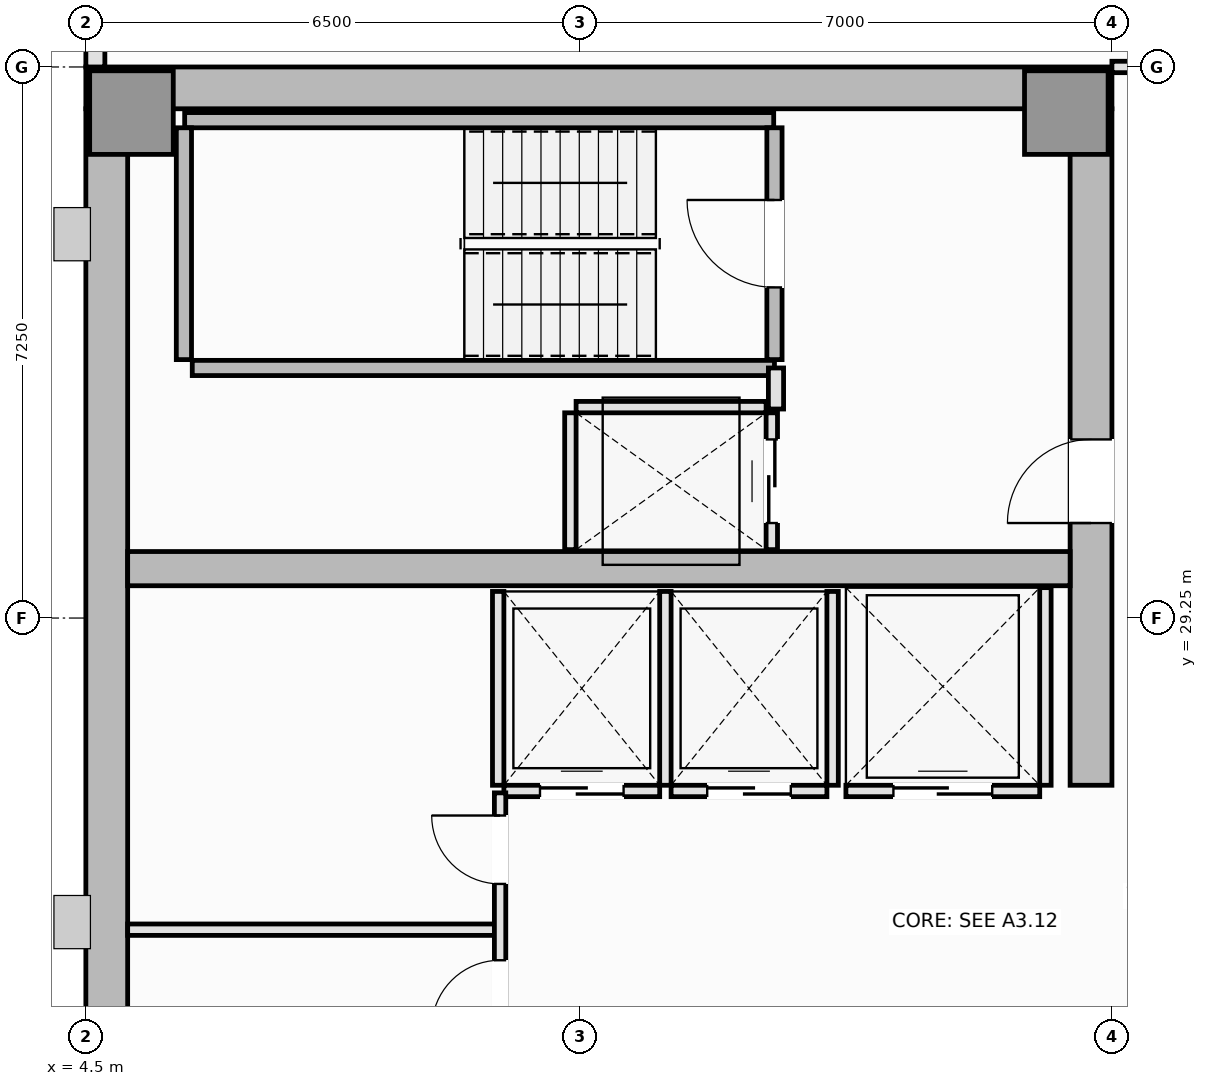
"""IFC4 building model, lengths in metres.
Left out: names, types, materials, properties, quantities, classifications, styles, units other than length and angle.
Written with IfcOpenShell. Run it as: python <this file> out.ifc"""

import sys

from ifc_helpers import new_model, si_unit, direction, frame, frame_2d, origin, origin_2d, place, context, subcontext, project, spatial, rectangle, extrude, element, fill, save


model = new_model("IFC4")
c1 = context("Model", 3, precision=1e-05, world=origin(), true_north=direction((0.0, 1.0)))
c2 = subcontext(c1, "Body", "Model", "MODEL_VIEW")
j1 = project(units=[si_unit("LENGTHUNIT", "METRE"), si_unit("PLANEANGLEUNIT", "RADIAN")], contexts=[c1])
p1 = place(None, origin())
s1 = spatial("IfcSite", under=j1, at=p1, CompositionType="ELEMENT")
p2 = place(p1, origin())
s2 = spatial("IfcBuilding", under=s1, at=p2, CompositionType="ELEMENT")
p3 = place(p2, frame((0.0, 0.0, 209.35)))
s3 = spatial("IfcBuildingStorey", under=s2, at=p3, CompositionType="ELEMENT", Elevation=209.35)
p4 = place(p3, frame((4.5, 36.225, 0.0), z_axis=(0.0, 0.0, 1.0), x_axis=(1.0, 0.0, 0.0)))
e1 = element("IfcWall", 1, at=p4, inside=s3, PredefinedType="SHEAR", context=c2, shape_type="SweptSolid", body=[
    extrude(rectangle(XDim=13.5, YDim=0.55, at=frame_2d((6.75, 0.0))), origin(), (0.0, 0.0, 1.0), 3.55),
])
p5 = place(p3, frame((4.775, 14.55, 0.0), z_axis=(0.0, 0.0, 1.0), x_axis=(0.0, 1.0, 0.0)))
e2 = element("IfcWall", 2, at=p5, inside=s3, PredefinedType="SHEAR", context=c2, shape_type="SweptSolid", body=[
    extrude(rectangle(XDim=21.4, YDim=0.55, at=frame_2d((10.7, 0.0))), origin(), (0.0, 0.0, 1.0), 3.55),
])
p6 = place(p3, frame((17.725, 27.05, 0.0), z_axis=(0.0, 0.0, 1.0), x_axis=(0.0, 1.0, 0.0)))
e3 = element("IfcWall", 3, at=p6, inside=s3, PredefinedType="SHEAR", context=c2, shape_type="SweptSolid", body=[
    extrude(rectangle(XDim=8.9, YDim=0.55, at=frame_2d((4.45, 0.0))), origin(), (0.0, 0.0, 1.0), 3.55),
])
p7 = place(p6, frame((3.45, 0.0, 0.0)))
e4 = element("IfcOpeningElement", 4, at=p7, cuts=e3, PredefinedType="OPENING", context=c2, shape_type="SweptSolid", body=[
    extrude(rectangle(XDim=1.1, YDim=2.15, at=frame_2d((0.55, 1.075))), frame((0.0, 0.285, 0.0), z_axis=(0.0, -1.0, 0.0), x_axis=(1.0, 0.0, 0.0)), (0.0, 0.0, 1.0), 0.57),
])
p8 = place(p3, frame((5.05, 29.9, 0.0), z_axis=(0.0, 0.0, 1.0), x_axis=(1.0, 0.0, 0.0)))
e5 = element("IfcWall", 5, at=p8, inside=s3, PredefinedType="SHEAR", context=c2, shape_type="SweptSolid", body=[
    extrude(rectangle(XDim=12.4, YDim=0.45, at=frame_2d((6.2, 0.0))), origin(), (0.0, 0.0, 1.0), 3.55),
])
for number, where, z_axis, x_axis in (
    (6, (5.1, 35.9, 0.0), (0.0, 0.0, 1.0), (1.0, 0.0, 0.0)),
    (7, (17.4, 35.9, 0.0), (0.0, 0.0, 1.0), (1.0, 0.0, 0.0)),
):
    element("IfcColumn", number, at=place(p3, frame(where, z_axis=z_axis, x_axis=x_axis)), inside=s3, PredefinedType="PILASTER", context=c2, shape_type="SweptSolid", body=[
        extrude(rectangle(XDim=1.1, YDim=1.1, at=origin_2d()), origin(), (0.0, 0.0, 1.0), 3.55),
    ])
p9 = place(p3, frame((4.625, 40.5, 0.0), z_axis=(0.0, 0.0, 1.0), x_axis=(0.0, -1.0, 0.0)))
e8 = element("IfcWall", 8, at=p9, inside=s3, PredefinedType="SOLIDWALL", context=c2, shape_type="SweptSolid", body=[
    extrude(rectangle(XDim=4.0, YDim=0.25, at=frame_2d((2.0, 0.0))), origin(), (0.0, 0.0, 1.0), 3.37),
])
p10 = place(p9, frame((0.9, 0.0, 0.9)))
e9 = element("IfcOpeningElement", 9, at=p10, cuts=e8, PredefinedType="OPENING", context=c2, shape_type="SweptSolid", body=[
    extrude(rectangle(XDim=2.2, YDim=1.8, at=frame_2d((1.1, 0.9))), frame((0.0, 0.135, 0.0), z_axis=(0.0, -1.0, 0.0), x_axis=(1.0, 0.0, 0.0)), (0.0, 0.0, 1.0), 0.27),
])
p11 = place(p3, frame((5.8, 35.8, 0.0), z_axis=(0.0, 0.0, 1.0), x_axis=(1.0, 0.0, 0.0)))
e10 = element("IfcWall", 10, at=p11, inside=s3, PredefinedType="SOLIDWALL", context=c2, shape_type="SweptSolid", body=[
    extrude(rectangle(XDim=7.75, YDim=0.2, at=frame_2d((3.875, 0.0))), origin(), (0.0, 0.0, 1.0), 3.55),
])
p12 = place(p3, frame((5.79, 32.65, 0.0), z_axis=(0.0, 0.0, 1.0), x_axis=(0.0, 1.0, 0.0)))
e11 = element("IfcWall", 11, at=p12, inside=s3, PredefinedType="SOLIDWALL", context=c2, shape_type="SweptSolid", body=[
    extrude(rectangle(XDim=3.05, YDim=0.2, at=frame_2d((1.525, 0.0))), origin(), (0.0, 0.0, 1.0), 3.55),
])
p13 = place(p3, frame((5.9, 32.54, 0.0), z_axis=(0.0, 0.0, 1.0), x_axis=(1.0, 0.0, 0.0)))
e12 = element("IfcWall", 12, at=p13, inside=s3, PredefinedType="SOLIDWALL", context=c2, shape_type="SweptSolid", body=[
    extrude(rectangle(XDim=7.66, YDim=0.2, at=frame_2d((3.83, 0.0))), origin(), (0.0, 0.0, 1.0), 3.55),
])
p14 = place(p3, frame((13.56, 32.65, 0.0), z_axis=(0.0, 0.0, 1.0), x_axis=(0.0, 1.0, 0.0)))
e13 = element("IfcWall", 13, at=p14, inside=s3, PredefinedType="SOLIDWALL", context=c2, shape_type="SweptSolid", body=[
    extrude(rectangle(XDim=3.05, YDim=0.2, at=frame_2d((1.525, 0.0))), origin(), (0.0, 0.0, 1.0), 3.55),
])
p15 = place(p14, frame((0.95, 0.0, 0.0)))
e14 = element("IfcOpeningElement", 14, at=p15, cuts=e13, PredefinedType="OPENING", context=c2, shape_type="SweptSolid", body=[
    extrude(rectangle(XDim=1.15, YDim=2.15, at=frame_2d((0.575, 1.075))), frame((0.0, 0.11, 0.0), z_axis=(0.0, -1.0, 0.0), x_axis=(1.0, 0.0, 0.0)), (0.0, 0.0, 1.0), 0.22),
])
p16 = place(p3, frame((10.0, 26.975, 0.0), z_axis=(0.0, 0.0, 1.0), x_axis=(1.0, 0.0, 0.0)))
e15 = element("IfcWall", 15, at=p16, inside=s3, PredefinedType="PARTITIONING", context=c2, shape_type="SweptSolid", body=[
    extrude(rectangle(XDim=2.05, YDim=0.15, at=frame_2d((1.025, 0.0))), origin(), (0.0, 0.0, 1.0), 3.37),
])
p17 = place(p16, frame((0.475, 0.0, 0.0)))
e16 = element("IfcOpeningElement", 16, at=p17, cuts=e15, PredefinedType="OPENING", context=c2, shape_type="SweptSolid", body=[
    extrude(rectangle(XDim=1.1, YDim=2.2, at=frame_2d((0.55, 1.1))), frame((0.0, 0.085, 0.0), z_axis=(0.0, -1.0, 0.0), x_axis=(1.0, 0.0, 0.0)), (0.0, 0.0, 1.0), 0.17),
])
for number, where, z_axis, x_axis in (
    (17, (9.925, 27.05, 0.0), (0.0, 0.0, 1.0), (0.0, 1.0, 0.0)),
    (18, (12.125, 27.05, 0.0), (0.0, 0.0, 1.0), (0.0, 1.0, 0.0)),
):
    element("IfcWall", number, at=place(p3, frame(where, z_axis=z_axis, x_axis=x_axis)), inside=s3, PredefinedType="PARTITIONING", context=c2, shape_type="SweptSolid", body=[
        extrude(rectangle(XDim=2.55, YDim=0.15, at=frame_2d((1.275, 0.0))), origin(), (0.0, 0.0, 1.0), 3.37),
    ])
p18 = place(p3, frame((12.2, 26.975, 0.0), z_axis=(0.0, 0.0, 1.0), x_axis=(1.0, 0.0, 0.0)))
e19 = element("IfcWall", 19, at=p18, inside=s3, PredefinedType="PARTITIONING", context=c2, shape_type="SweptSolid", body=[
    extrude(rectangle(XDim=2.05, YDim=0.15, at=frame_2d((1.025, 0.0))), origin(), (0.0, 0.0, 1.0), 3.37),
])
p19 = place(p18, frame((0.475, 0.0, 0.0)))
e20 = element("IfcOpeningElement", 20, at=p19, cuts=e19, PredefinedType="OPENING", context=c2, shape_type="SweptSolid", body=[
    extrude(rectangle(XDim=1.1, YDim=2.2, at=frame_2d((0.55, 1.1))), frame((0.0, 0.085, 0.0), z_axis=(0.0, -1.0, 0.0), x_axis=(1.0, 0.0, 0.0)), (0.0, 0.0, 1.0), 0.17),
])
p20 = place(p3, frame((14.325, 27.05, 0.0), z_axis=(0.0, 0.0, 1.0), x_axis=(0.0, 1.0, 0.0)))
e21 = element("IfcWall", 21, at=p20, inside=s3, PredefinedType="PARTITIONING", context=c2, shape_type="SweptSolid", body=[
    extrude(rectangle(XDim=2.55, YDim=0.15, at=frame_2d((1.275, 0.0))), origin(), (0.0, 0.0, 1.0), 3.37),
])
p21 = place(p3, frame((14.5, 26.975, 0.0), z_axis=(0.0, 0.0, 1.0), x_axis=(1.0, 0.0, 0.0)))
e22 = element("IfcWall", 22, at=p21, inside=s3, PredefinedType="PARTITIONING", context=c2, shape_type="SweptSolid", body=[
    extrude(rectangle(XDim=2.55, YDim=0.15, at=frame_2d((1.275, 0.0))), origin(), (0.0, 0.0, 1.0), 3.37),
])
p22 = place(p21, frame((0.625, 0.0, 0.0)))
e23 = element("IfcOpeningElement", 23, at=p22, cuts=e22, PredefinedType="OPENING", context=c2, shape_type="SweptSolid", body=[
    extrude(rectangle(XDim=1.3, YDim=2.2, at=frame_2d((0.65, 1.1))), frame((0.0, 0.085, 0.0), z_axis=(0.0, -1.0, 0.0), x_axis=(1.0, 0.0, 0.0)), (0.0, 0.0, 1.0), 0.17),
])
p23 = place(p3, frame((17.125, 27.05, 0.0), z_axis=(0.0, 0.0, 1.0), x_axis=(0.0, 1.0, 0.0)))
e24 = element("IfcWall", 24, at=p23, inside=s3, PredefinedType="PARTITIONING", context=c2, shape_type="SweptSolid", body=[
    extrude(rectangle(XDim=2.6, YDim=0.15, at=frame_2d((1.3, 0.0))), origin(), (0.0, 0.0, 1.0), 3.37),
])
p24 = place(p3, frame((10.95, 32.025, 0.0), z_axis=(0.0, 0.0, 1.0), x_axis=(1.0, 0.0, 0.0)))
e25 = element("IfcWall", 25, at=p24, inside=s3, PredefinedType="PARTITIONING", context=c2, shape_type="SweptSolid", body=[
    extrude(rectangle(XDim=2.5, YDim=0.15, at=frame_2d((1.25, 0.0))), origin(), (0.0, 0.0, 1.0), 3.37),
])
p25 = place(p3, frame((10.875, 30.15, 0.0), z_axis=(0.0, 0.0, 1.0), x_axis=(0.0, 1.0, 0.0)))
e26 = element("IfcWall", 26, at=p25, inside=s3, PredefinedType="PARTITIONING", context=c2, shape_type="SweptSolid", body=[
    extrude(rectangle(XDim=1.8, YDim=0.15, at=frame_2d((0.9, 0.0))), origin(), (0.0, 0.0, 1.0), 3.37),
])
p26 = place(p3, frame((13.525, 30.15, 0.0), z_axis=(0.0, 0.0, 1.0), x_axis=(0.0, 1.0, 0.0)))
e27 = element("IfcWall", 27, at=p26, inside=s3, PredefinedType="PARTITIONING", context=c2, shape_type="SweptSolid", body=[
    extrude(rectangle(XDim=1.8, YDim=0.15, at=frame_2d((0.9, 0.0))), origin(), (0.0, 0.0, 1.0), 3.37),
])
p27 = place(p26, frame((0.35, 0.0, 0.0)))
e28 = element("IfcOpeningElement", 28, at=p27, cuts=e27, PredefinedType="OPENING", context=c2, shape_type="SweptSolid", body=[
    extrude(rectangle(XDim=1.1, YDim=2.2, at=frame_2d((0.55, 1.1))), frame((0.0, 0.085, 0.0), z_axis=(0.0, -1.0, 0.0), x_axis=(1.0, 0.0, 0.0)), (0.0, 0.0, 1.0), 0.17),
])
p28 = place(p3, frame((13.58, 32.0, 0.0), z_axis=(0.0, 0.0, 1.0), x_axis=(0.0, 1.0, 0.0)))
e29 = element("IfcWall", 29, at=p28, inside=s3, PredefinedType="PARTITIONING", context=c2, shape_type="SweptSolid", body=[
    extrude(rectangle(XDim=0.54, YDim=0.2, at=frame_2d((0.27, 0.0))), origin(), (0.0, 0.0, 1.0), 3.37),
])
p29 = place(p3, frame((5.05, 25.15, 0.0), z_axis=(0.0, 0.0, 1.0), x_axis=(1.0, 0.0, 0.0)))
e30 = element("IfcWall", 30, at=p29, inside=s3, PredefinedType="PARTITIONING", context=c2, shape_type="SweptSolid", body=[
    extrude(rectangle(XDim=4.9, YDim=0.15, at=frame_2d((2.45, 0.0))), origin(), (0.0, 0.0, 1.0), 3.37),
])
p30 = place(p3, frame((9.95, 23.55, 0.0), z_axis=(0.0, 0.0, 1.0), x_axis=(0.0, 1.0, 0.0)))
e31 = element("IfcWall", 31, at=p30, inside=s3, PredefinedType="PARTITIONING", context=c2, shape_type="SweptSolid", body=[
    extrude(rectangle(XDim=3.4, YDim=0.15, at=frame_2d((1.7, 0.0))), origin(), (0.0, 0.0, 1.0), 3.37),
])
p31 = place(p30, frame((0.298, 0.0, 0.0)))
e32 = element("IfcOpeningElement", 32, at=p31, cuts=e31, PredefinedType="OPENING", context=c2, shape_type="SweptSolid", body=[
    extrude(rectangle(XDim=0.9, YDim=2.1, at=frame_2d((0.45, 1.05))), frame((0.0, 0.085, 0.0), z_axis=(0.0, -1.0, 0.0), x_axis=(1.0, 0.0, 0.0)), (0.0, 0.0, 1.0), 0.17),
])
p32 = place(p30, frame((2.202, 0.0, 0.0)))
e33 = element("IfcOpeningElement", 33, at=p32, cuts=e31, PredefinedType="OPENING", context=c2, shape_type="SweptSolid", body=[
    extrude(rectangle(XDim=0.9, YDim=2.1, at=frame_2d((0.45, 1.05))), frame((0.0, 0.085, 0.0), z_axis=(0.0, -1.0, 0.0), x_axis=(1.0, 0.0, 0.0)), (0.0, 0.0, 1.0), 0.17),
])
p33 = place(p3, frame((18.0, 36.5, 0.0), z_axis=(0.0, 0.0, 1.0), x_axis=(1.0, 0.0, 0.0)))
e34 = element("IfcWall", 34, at=p33, inside=s3, PredefinedType="PARTITIONING", context=c2, shape_type="SweptSolid", body=[
    extrude(rectangle(XDim=1.9, YDim=0.15, at=frame_2d((0.95, 0.0))), origin(), (0.0, 0.0, 1.0), 3.37),
])
p34 = place(p33, frame((0.5, 0.0, 0.0)))
e35 = element("IfcOpeningElement", 35, at=p34, cuts=e34, PredefinedType="OPENING", context=c2, shape_type="SweptSolid", body=[
    extrude(rectangle(XDim=0.9, YDim=2.1, at=frame_2d((0.45, 1.05))), frame((0.0, 0.085, 0.0), z_axis=(0.0, -1.0, 0.0), x_axis=(1.0, 0.0, 0.0)), (0.0, 0.0, 1.0), 0.17),
])
p35 = place(p15, origin())
e36 = element("IfcDoor", 36, at=p35, inside=s3, OperationType="SINGLE_SWING_RIGHT", PredefinedType="DOOR", context=c2, shape_type="SweptSolid", body=[
    extrude(rectangle(XDim=1.15, YDim=2.15, at=frame_2d((0.575, 1.075))), frame((0.0, 0.025, 0.0), z_axis=(0.0, -1.0, 0.0), x_axis=(1.0, 0.0, 0.0)), (0.0, 0.0, 1.0), 0.05),
])
fill(e14, e36)
p36 = place(p17, origin())
e37 = element("IfcDoor", 37, at=p36, inside=s3, OperationType="DOUBLE_DOOR_SLIDING", PredefinedType="DOOR", context=c2, shape_type="SweptSolid", body=[
    extrude(rectangle(XDim=1.1, YDim=2.2, at=frame_2d((0.55, 1.1))), frame((0.0, 0.025, 0.0), z_axis=(0.0, -1.0, 0.0), x_axis=(1.0, 0.0, 0.0)), (0.0, 0.0, 1.0), 0.05),
])
fill(e16, e37)
p37 = place(p19, origin())
e38 = element("IfcDoor", 38, at=p37, inside=s3, OperationType="DOUBLE_DOOR_SLIDING", PredefinedType="DOOR", context=c2, shape_type="SweptSolid", body=[
    extrude(rectangle(XDim=1.1, YDim=2.2, at=frame_2d((0.55, 1.1))), frame((0.0, 0.025, 0.0), z_axis=(0.0, -1.0, 0.0), x_axis=(1.0, 0.0, 0.0)), (0.0, 0.0, 1.0), 0.05),
])
fill(e20, e38)
p38 = place(p22, origin())
e39 = element("IfcDoor", 39, at=p38, inside=s3, OperationType="DOUBLE_DOOR_SLIDING", PredefinedType="DOOR", context=c2, shape_type="SweptSolid", body=[
    extrude(rectangle(XDim=1.3, YDim=2.2, at=frame_2d((0.65, 1.1))), frame((0.0, 0.025, 0.0), z_axis=(0.0, -1.0, 0.0), x_axis=(1.0, 0.0, 0.0)), (0.0, 0.0, 1.0), 0.05),
])
fill(e23, e39)
p39 = place(p27, origin())
e40 = element("IfcDoor", 40, at=p39, inside=s3, OperationType="DOUBLE_DOOR_SLIDING", PredefinedType="DOOR", context=c2, shape_type="SweptSolid", body=[
    extrude(rectangle(XDim=1.1, YDim=2.2, at=frame_2d((0.55, 1.1))), frame((0.0, 0.025, 0.0), z_axis=(0.0, -1.0, 0.0), x_axis=(1.0, 0.0, 0.0)), (0.0, 0.0, 1.0), 0.05),
])
fill(e28, e40)
p40 = place(p7, origin())
e41 = element("IfcDoor", 41, at=p40, inside=s3, OperationType="SINGLE_SWING_LEFT", PredefinedType="DOOR", context=c2, shape_type="SweptSolid", body=[
    extrude(rectangle(XDim=1.1, YDim=2.15, at=frame_2d((0.55, 1.075))), frame((0.0, 0.025, 0.0), z_axis=(0.0, -1.0, 0.0), x_axis=(1.0, 0.0, 0.0)), (0.0, 0.0, 1.0), 0.05),
])
fill(e4, e41)
p41 = place(p31, origin())
e42 = element("IfcDoor", 42, at=p41, inside=s3, OperationType="SINGLE_SWING_LEFT", PredefinedType="DOOR", context=c2, shape_type="SweptSolid", body=[
    extrude(rectangle(XDim=0.9, YDim=2.1, at=frame_2d((0.45, 1.05))), frame((0.0, 0.025, 0.0), z_axis=(0.0, -1.0, 0.0), x_axis=(1.0, 0.0, 0.0)), (0.0, 0.0, 1.0), 0.05),
])
fill(e32, e42)
p42 = place(p32, origin())
e43 = element("IfcDoor", 43, at=p42, inside=s3, OperationType="SINGLE_SWING_RIGHT", PredefinedType="DOOR", context=c2, shape_type="SweptSolid", body=[
    extrude(rectangle(XDim=0.9, YDim=2.1, at=frame_2d((0.45, 1.05))), frame((0.0, 0.025, 0.0), z_axis=(0.0, -1.0, 0.0), x_axis=(1.0, 0.0, 0.0)), (0.0, 0.0, 1.0), 0.05),
])
fill(e33, e43)
save(model, sys.argv[1])
